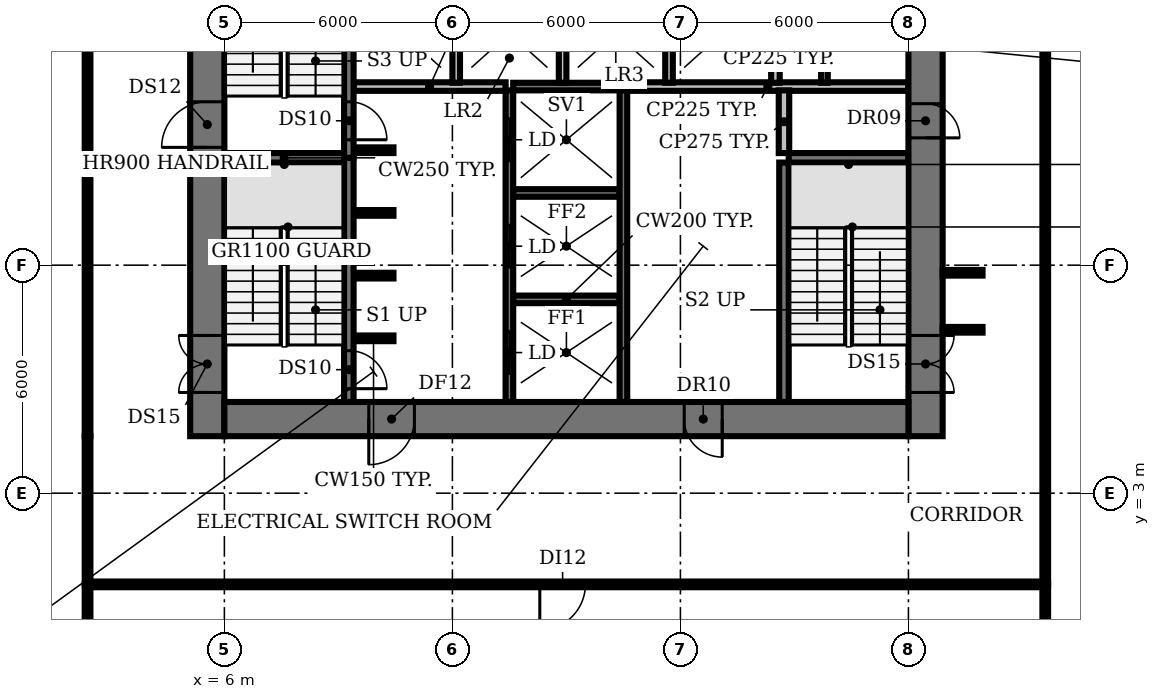
"""IFC4 building model, lengths in metres.
Left out: names, types, materials, properties, quantities, classifications, styles, units other than length and angle.
Written with IfcOpenShell. Run it as: python <this file> out.ifc"""

import sys

from ifc_helpers import new_model, si_unit, direction, frame, frame_2d, origin, place, context, subcontext, project, spatial, rectangle, extrude, element, fill, save


model = new_model("IFC4")
c1 = context("Model", 3, precision=1e-05, world=origin(), true_north=direction((0.0, 1.0)))
c2 = subcontext(c1, "Body", "Model", "MODEL_VIEW")
j1 = project(units=[si_unit("LENGTHUNIT", "METRE"), si_unit("PLANEANGLEUNIT", "RADIAN")], contexts=[c1])
p1 = place(None, origin())
s1 = spatial("IfcSite", under=j1, at=p1, CompositionType="ELEMENT")
p2 = place(p1, origin())
s2 = spatial("IfcBuilding", under=s1, at=p2, CompositionType="ELEMENT")
p3 = place(p2, frame((0.0, 0.0, 29.0)))
s3 = spatial("IfcBuildingStorey", under=s2, at=p3, CompositionType="ELEMENT", Elevation=29.0)
p4 = place(p3, frame((9.4, 7.075, 0.0), z_axis=(0.0, 0.0, 1.0), x_axis=(1.0, 0.0, 0.0)))
e1 = element("IfcWall", 1, at=p4, inside=s3, PredefinedType="SHEAR", context=c2, shape_type="SweptSolid", body=[
    extrude(rectangle(XDim=1.05, YDim=0.15, at=frame_2d((0.525, 0.0))), origin(), (0.0, 0.0, 1.0), 3.85),
])
p5 = place(p3, frame((13.6, 8.1, 0.0), z_axis=(0.0, 0.0, 1.0), x_axis=(1.0, 0.0, 0.0)))
e2 = element("IfcWall", 2, at=p5, inside=s3, PredefinedType="SHEAR", context=c2, shape_type="SweptSolid", body=[
    extrude(rectangle(XDim=2.8, YDim=0.2, at=frame_2d((1.4, 0.0))), origin(), (0.0, 0.0, 1.0), 3.85),
])
for number, where, z_axis, x_axis in (
    (3, (9.4, 8.725, 0.0), (0.0, 0.0, 1.0), (1.0, 0.0, 0.0)),
    (4, (9.4, 10.375, 0.0), (0.0, 0.0, 1.0), (1.0, 0.0, 0.0)),
):
    element("IfcWall", number, at=place(p3, frame(where, z_axis=z_axis, x_axis=x_axis)), inside=s3, PredefinedType="SHEAR", context=c2, shape_type="SweptSolid", body=[
        extrude(rectangle(XDim=1.05, YDim=0.15, at=frame_2d((0.525, 0.0))), origin(), (0.0, 0.0, 1.0), 3.85),
    ])
p6 = place(p3, frame((13.6, 10.9, 0.0), z_axis=(0.0, 0.0, 1.0), x_axis=(1.0, 0.0, 0.0)))
e5 = element("IfcWall", 5, at=p6, inside=s3, PredefinedType="SHEAR", context=c2, shape_type="SweptSolid", body=[
    extrude(rectangle(XDim=2.8, YDim=0.2, at=frame_2d((1.4, 0.0))), origin(), (0.0, 0.0, 1.0), 3.85),
])
for number, where, z_axis, x_axis in (
    (6, (6.0, 11.825, 0.0), (0.0, 0.0, 1.0), (1.0, 0.0, 0.0)),
    (7, (20.85, 11.825, 0.0), (0.0, 0.0, 1.0), (1.0, 0.0, 0.0)),
):
    element("IfcWall", number, at=place(p3, frame(where, z_axis=z_axis, x_axis=x_axis)), inside=s3, PredefinedType="SHEAR", context=c2, shape_type="SweptSolid", body=[
        extrude(rectangle(XDim=3.15, YDim=0.25, at=frame_2d((1.575, 0.0))), origin(), (0.0, 0.0, 1.0), 3.85),
    ])
p7 = place(p3, frame((9.4, 12.025, 0.0), z_axis=(0.0, 0.0, 1.0), x_axis=(1.0, 0.0, 0.0)))
e8 = element("IfcWall", 8, at=p7, inside=s3, PredefinedType="SHEAR", context=c2, shape_type="SweptSolid", body=[
    extrude(rectangle(XDim=1.05, YDim=0.15, at=frame_2d((0.525, 0.0))), origin(), (0.0, 0.0, 1.0), 3.85),
])
p8 = place(p3, frame((9.4, 13.7, 0.0), z_axis=(0.0, 0.0, 1.0), x_axis=(1.0, 0.0, 0.0)))
e9 = element("IfcWall", 9, at=p8, inside=s3, PredefinedType="PARTITIONING", context=c2, shape_type="SweptSolid", body=[
    extrude(rectangle(XDim=4.0, YDim=0.225, at=frame_2d((2.0, 0.0))), origin(), (0.0, 0.0, 1.0), 3.85),
])
p9 = place(p3, frame((13.6, 13.7, 0.0), z_axis=(0.0, 0.0, 1.0), x_axis=(1.0, 0.0, 0.0)))
e10 = element("IfcWall", 10, at=p9, inside=s3, PredefinedType="SHEAR", context=c2, shape_type="SweptSolid", body=[
    extrude(rectangle(XDim=2.8, YDim=0.2, at=frame_2d((1.4, 0.0))), origin(), (0.0, 0.0, 1.0), 3.85),
])
p10 = place(p3, frame((16.6, 13.7, 0.0), z_axis=(0.0, 0.0, 1.0), x_axis=(1.0, 0.0, 0.0)))
e11 = element("IfcWall", 11, at=p10, inside=s3, PredefinedType="PARTITIONING", context=c2, shape_type="SweptSolid", body=[
    extrude(rectangle(XDim=7.4, YDim=0.225, at=frame_2d((3.7, 0.0))), origin(), (0.0, 0.0, 1.0), 3.85),
])
p11 = place(p3, frame((9.275, 11.825, 0.0), z_axis=(0.0, 0.0, 1.0), x_axis=(0.0, -1.0, 0.0)))
e12 = element("IfcWall", 12, at=p11, inside=s3, PredefinedType="SHEAR", context=c2, shape_type="SweptSolid", body=[
    extrude(rectangle(XDim=6.425, YDim=0.25, at=frame_2d((3.212, 0.0))), origin(), (0.0, 0.0, 1.0), 3.85),
])
p12 = place(p11, frame((5.075, 0.0, 0.0)))
e13 = element("IfcOpeningElement", 13, at=p12, cuts=e12, PredefinedType="OPENING", context=c2, shape_type="SweptSolid", body=[
    extrude(rectangle(XDim=1.0, YDim=2.1, at=frame_2d((0.5, 1.05))), frame((0.0, 0.135, 0.0), z_axis=(0.0, -1.0, 0.0), x_axis=(1.0, 0.0, 0.0)), (0.0, 0.0, 1.0), 0.27),
])
p13 = place(p3, frame((9.275, 18.375, 0.0), z_axis=(0.0, 0.0, 1.0), x_axis=(0.0, -1.0, 0.0)))
e14 = element("IfcWall", 14, at=p13, inside=s3, PredefinedType="SHEAR", context=c2, shape_type="SweptSolid", body=[
    extrude(rectangle(XDim=6.55, YDim=0.25, at=frame_2d((3.275, 0.0))), origin(), (0.0, 0.0, 1.0), 3.85),
])
p14 = place(p13, frame((5.075, 0.0, 0.0)))
e15 = element("IfcOpeningElement", 15, at=p14, cuts=e14, PredefinedType="OPENING", context=c2, shape_type="SweptSolid", body=[
    extrude(rectangle(XDim=1.0, YDim=2.1, at=frame_2d((0.5, 1.05))), frame((0.0, 0.135, 0.0), z_axis=(0.0, -1.0, 0.0), x_axis=(1.0, 0.0, 0.0)), (0.0, 0.0, 1.0), 0.27),
])
p15 = place(p3, frame((12.1, 13.8, 0.0), z_axis=(0.0, 0.0, 1.0), x_axis=(0.0, 1.0, 0.0)))
e16 = element("IfcWall", 16, at=p15, inside=s3, PredefinedType="SOLIDWALL", context=c2, shape_type="SweptSolid", body=[
    extrude(rectangle(XDim=2.6, YDim=0.2, at=frame_2d((1.3, 0.0))), origin(), (0.0, 0.0, 1.0), 3.85),
])
p16 = place(p3, frame((13.5, 5.4, 0.0), z_axis=(0.0, 0.0, 1.0), x_axis=(0.0, 1.0, 0.0)))
e17 = element("IfcWall", 17, at=p16, inside=s3, PredefinedType="SHEAR", context=c2, shape_type="SweptSolid", body=[
    extrude(rectangle(XDim=8.2, YDim=0.2, at=frame_2d((4.1, 0.0))), origin(), (0.0, 0.0, 1.0), 3.85),
])
p17 = place(p16, frame((0.75, 0.0, 0.0)))
e18 = element("IfcOpeningElement", 18, at=p17, cuts=e17, PredefinedType="OPENING", context=c2, shape_type="SweptSolid", body=[
    extrude(rectangle(XDim=1.1, YDim=2.1, at=frame_2d((0.55, 1.05))), frame((0.0, 0.11, 0.0), z_axis=(0.0, -1.0, 0.0), x_axis=(1.0, 0.0, 0.0)), (0.0, 0.0, 1.0), 0.22),
])
p18 = place(p16, frame((3.55, 0.0, 0.0)))
e19 = element("IfcOpeningElement", 19, at=p18, cuts=e17, PredefinedType="OPENING", context=c2, shape_type="SweptSolid", body=[
    extrude(rectangle(XDim=1.1, YDim=2.1, at=frame_2d((0.55, 1.05))), frame((0.0, 0.11, 0.0), z_axis=(0.0, -1.0, 0.0), x_axis=(1.0, 0.0, 0.0)), (0.0, 0.0, 1.0), 0.22),
])
p19 = place(p16, frame((6.35, 0.0, 0.0)))
e20 = element("IfcOpeningElement", 20, at=p19, cuts=e17, PredefinedType="OPENING", context=c2, shape_type="SweptSolid", body=[
    extrude(rectangle(XDim=1.1, YDim=2.1, at=frame_2d((0.55, 1.05))), frame((0.0, 0.11, 0.0), z_axis=(0.0, -1.0, 0.0), x_axis=(1.0, 0.0, 0.0)), (0.0, 0.0, 1.0), 0.22),
])
p20 = place(p3, frame((14.9, 13.8, 0.0), z_axis=(0.0, 0.0, 1.0), x_axis=(0.0, 1.0, 0.0)))
e21 = element("IfcWall", 21, at=p20, inside=s3, PredefinedType="SOLIDWALL", context=c2, shape_type="SweptSolid", body=[
    extrude(rectangle(XDim=2.6, YDim=0.2, at=frame_2d((1.3, 0.0))), origin(), (0.0, 0.0, 1.0), 3.85),
])
p21 = place(p3, frame((16.5, 5.4, 0.0), z_axis=(0.0, 0.0, 1.0), x_axis=(0.0, 1.0, 0.0)))
e22 = element("IfcWall", 22, at=p21, inside=s3, PredefinedType="SHEAR", context=c2, shape_type="SweptSolid", body=[
    extrude(rectangle(XDim=8.2, YDim=0.2, at=frame_2d((4.1, 0.0))), origin(), (0.0, 0.0, 1.0), 3.85),
])
p22 = place(p3, frame((17.7, 13.8, 0.0), z_axis=(0.0, 0.0, 1.0), x_axis=(0.0, 1.0, 0.0)))
e23 = element("IfcWall", 23, at=p22, inside=s3, PredefinedType="SOLIDWALL", context=c2, shape_type="SweptSolid", body=[
    extrude(rectangle(XDim=2.6, YDim=0.2, at=frame_2d((1.3, 0.0))), origin(), (0.0, 0.0, 1.0), 3.85),
])
p23 = place(p3, frame((20.5, 13.8, 0.0), z_axis=(0.0, 0.0, 1.0), x_axis=(0.0, 1.0, 0.0)))
e24 = element("IfcWall", 24, at=p23, inside=s3, PredefinedType="PARTITIONING", context=c2, shape_type="SweptSolid", body=[
    extrude(rectangle(XDim=2.6, YDim=0.225, at=frame_2d((1.3, 0.0))), origin(), (0.0, 0.0, 1.0), 3.85),
])
p24 = place(p3, frame((20.725, 5.4, 0.0), z_axis=(0.0, 0.0, 1.0), x_axis=(0.0, 1.0, 0.0)))
e25 = element("IfcWall", 25, at=p24, inside=s3, PredefinedType="SHEAR", context=c2, shape_type="SweptSolid", body=[
    extrude(rectangle(XDim=6.3, YDim=0.25, at=frame_2d((3.15, 0.0))), origin(), (0.0, 0.0, 1.0), 3.85),
])
p25 = place(p3, frame((20.725, 11.95, 0.0), z_axis=(0.0, 0.0, 1.0), x_axis=(0.0, 1.0, 0.0)))
e26 = element("IfcWall", 26, at=p25, inside=s3, PredefinedType="PARTITIONING", context=c2, shape_type="SweptSolid", body=[
    extrude(rectangle(XDim=1.65, YDim=0.275, at=frame_2d((0.825, 0.0))), origin(), (0.0, 0.0, 1.0), 3.85),
])
p26 = place(p3, frame((21.79, 13.8, 0.0), z_axis=(0.0, 0.0, 1.0), x_axis=(0.0, 1.0, 0.0)))
e27 = element("IfcWall", 27, at=p26, inside=s3, PredefinedType="PARTITIONING", context=c2, shape_type="SweptSolid", body=[
    extrude(rectangle(XDim=2.6, YDim=0.175, at=frame_2d((1.3, 0.0))), origin(), (0.0, 0.0, 1.0), 3.85),
])
p27 = place(p3, frame((5.55, 4.5, 0.0), z_axis=(0.0, 0.0, 1.0), x_axis=(0.0, 1.0, 0.0)))
e28 = element("IfcWall", 28, at=p27, inside=s3, PredefinedType="SHEAR", context=c2, shape_type="SweptSolid", body=[
    extrude(rectangle(XDim=21.2, YDim=0.9, at=frame_2d((10.6, 0.0))), origin(), (0.0, 0.0, 1.0), 3.85),
])
p28 = place(p27, frame((1.15, 0.0, 0.0)))
e29 = element("IfcOpeningElement", 29, at=p28, cuts=e28, PredefinedType="OPENING", context=c2, shape_type="SweptSolid", body=[
    extrude(rectangle(XDim=1.5, YDim=2.1, at=frame_2d((0.75, 1.05))), frame((0.0, 0.46, 0.0), z_axis=(0.0, -1.0, 0.0), x_axis=(1.0, 0.0, 0.0)), (0.0, 0.0, 1.0), 0.92),
])
p29 = place(p27, frame((7.6, 0.0, 0.0)))
e30 = element("IfcOpeningElement", 30, at=p29, cuts=e28, PredefinedType="OPENING", context=c2, shape_type="SweptSolid", body=[
    extrude(rectangle(XDim=1.2, YDim=2.1, at=frame_2d((0.6, 1.05))), frame((0.0, 0.46, 0.0), z_axis=(0.0, -1.0, 0.0), x_axis=(1.0, 0.0, 0.0)), (0.0, 0.0, 1.0), 0.92),
])
p30 = place(p27, frame((14.15, 0.0, 0.0)))
e31 = element("IfcOpeningElement", 31, at=p30, cuts=e28, PredefinedType="OPENING", context=c2, shape_type="SweptSolid", body=[
    extrude(rectangle(XDim=1.2, YDim=2.1, at=frame_2d((0.6, 1.05))), frame((0.0, 0.46, 0.0), z_axis=(0.0, -1.0, 0.0), x_axis=(1.0, 0.0, 0.0)), (0.0, 0.0, 1.0), 0.92),
])
p31 = place(p3, frame((24.45, 25.7, 0.0), z_axis=(0.0, 0.0, 1.0), x_axis=(0.0, -1.0, 0.0)))
e32 = element("IfcWall", 32, at=p31, inside=s3, PredefinedType="SHEAR", context=c2, shape_type="SweptSolid", body=[
    extrude(rectangle(XDim=21.2, YDim=0.9, at=frame_2d((10.6, 0.0))), origin(), (0.0, 0.0, 1.0), 3.85),
])
p32 = place(p31, frame((18.55, 0.0, 0.0)))
e33 = element("IfcOpeningElement", 33, at=p32, cuts=e32, PredefinedType="OPENING", context=c2, shape_type="SweptSolid", body=[
    extrude(rectangle(XDim=1.5, YDim=2.1, at=frame_2d((0.75, 1.05))), frame((0.0, 0.46, 0.0), z_axis=(0.0, -1.0, 0.0), x_axis=(1.0, 0.0, 0.0)), (0.0, 0.0, 1.0), 0.92),
])
p33 = place(p31, frame((12.45, 0.0, 0.0)))
e34 = element("IfcOpeningElement", 34, at=p33, cuts=e32, PredefinedType="OPENING", context=c2, shape_type="SweptSolid", body=[
    extrude(rectangle(XDim=0.9, YDim=2.1, at=frame_2d((0.45, 1.05))), frame((0.0, 0.46, 0.0), z_axis=(0.0, -1.0, 0.0), x_axis=(1.0, 0.0, 0.0)), (0.0, 0.0, 1.0), 0.92),
])
p34 = place(p31, frame((6.45, 0.0, 0.0)))
e35 = element("IfcOpeningElement", 35, at=p34, cuts=e32, PredefinedType="OPENING", context=c2, shape_type="SweptSolid", body=[
    extrude(rectangle(XDim=2.0, YDim=2.1, at=frame_2d((1.0, 1.05))), frame((0.0, 0.46, 0.0), z_axis=(0.0, -1.0, 0.0), x_axis=(1.0, 0.0, 0.0)), (0.0, 0.0, 1.0), 0.92),
])
p35 = place(p3, frame((24.0, 4.95, 0.0), z_axis=(0.0, 0.0, 1.0), x_axis=(-1.0, 0.0, 0.0)))
e36 = element("IfcWall", 36, at=p35, inside=s3, PredefinedType="SHEAR", context=c2, shape_type="SweptSolid", body=[
    extrude(rectangle(XDim=18.0, YDim=0.9, at=frame_2d((9.0, 0.0))), origin(), (0.0, 0.0, 1.0), 3.85),
])
p36 = place(p35, frame((13.0, 0.0, 0.0)))
e37 = element("IfcOpeningElement", 37, at=p36, cuts=e36, PredefinedType="OPENING", context=c2, shape_type="SweptSolid", body=[
    extrude(rectangle(XDim=1.2, YDim=2.1, at=frame_2d((0.6, 1.05))), frame((0.0, 0.46, 0.0), z_axis=(0.0, -1.0, 0.0), x_axis=(1.0, 0.0, 0.0)), (0.0, 0.0, 1.0), 0.92),
])
p37 = place(p35, frame((4.9, 0.0, 0.0)))
e38 = element("IfcOpeningElement", 38, at=p37, cuts=e36, PredefinedType="OPENING", context=c2, shape_type="SweptSolid", body=[
    extrude(rectangle(XDim=1.0, YDim=2.1, at=frame_2d((0.5, 1.05))), frame((0.0, 0.46, 0.0), z_axis=(0.0, -1.0, 0.0), x_axis=(1.0, 0.0, 0.0)), (0.0, 0.0, 1.0), 0.92),
])
p38 = place(p3, frame((2.4, -2.22, 0.0), z_axis=(0.0, 0.0, 1.0), x_axis=(0.0, 1.0, 0.0)))
e39 = element("IfcWall", 39, at=p38, inside=s3, PredefinedType="PARTITIONING", context=c2, shape_type="SweptSolid", body=[
    extrude(rectangle(XDim=2.82, YDim=0.15, at=frame_2d((1.41, 0.0))), origin(), (0.0, 0.0, 1.0), 2.83),
])
p39 = place(p3, frame((2.4, 0.6, 0.0), z_axis=(0.0, 0.0, 1.0), x_axis=(0.0, 1.0, 0.0)))
e40 = element("IfcWall", 40, at=p39, inside=s3, PredefinedType="PARTITIONING", context=c2, shape_type="SweptSolid", body=[
    extrude(rectangle(XDim=3.9, YDim=0.15, at=frame_2d((1.95, 0.0))), origin(), (0.0, 0.0, 1.0), 2.83),
])
p40 = place(p3, frame((2.4, 4.5, 0.0), z_axis=(0.0, 0.0, 1.0), x_axis=(0.0, 1.0, 0.0)))
e41 = element("IfcWall", 41, at=p40, inside=s3, PredefinedType="PARTITIONING", context=c2, shape_type="SweptSolid", body=[
    extrude(rectangle(XDim=21.2, YDim=0.15, at=frame_2d((10.6, 0.0))), origin(), (0.0, 0.0, 1.0), 2.83),
])
p41 = place(p40, frame((10.8, 0.0, 0.0)))
e42 = element("IfcOpeningElement", 42, at=p41, cuts=e41, PredefinedType="OPENING", context=c2, shape_type="SweptSolid", body=[
    extrude(rectangle(XDim=1.2, YDim=2.1, at=frame_2d((0.6, 1.05))), frame((0.0, 0.085, 0.0), z_axis=(0.0, -1.0, 0.0), x_axis=(1.0, 0.0, 0.0)), (0.0, 0.0, 1.0), 0.17),
])
for number, where, z_axis, x_axis in (
    (43, (24.9, 7.3, 0.0), (0.0, 0.0, 1.0), (1.0, 0.0, 0.0)),
    (44, (24.9, 8.8, 0.0), (0.0, 0.0, 1.0), (1.0, 0.0, 0.0)),
):
    element("IfcWall", number, at=place(p3, frame(where, z_axis=z_axis, x_axis=x_axis)), inside=s3, PredefinedType="PARTITIONING", context=c2, shape_type="SweptSolid", body=[
        extrude(rectangle(XDim=1.05, YDim=0.15, at=frame_2d((0.525, 0.0))), origin(), (0.0, 0.0, 1.0), 2.83),
    ])
p42 = place(p3, frame((27.6, -5.18, 0.0), z_axis=(0.0, 0.0, 1.0), x_axis=(0.0, 1.0, 0.0)))
e45 = element("IfcWall", 45, at=p42, inside=s3, PredefinedType="PARTITIONING", context=c2, shape_type="SweptSolid", body=[
    extrude(rectangle(XDim=5.78, YDim=0.15, at=frame_2d((2.89, 0.0))), origin(), (0.0, 0.0, 1.0), 2.83),
])
p43 = place(p3, frame((27.6, 0.6, 0.0), z_axis=(0.0, 0.0, 1.0), x_axis=(-1.0, 0.0, 0.0)))
e46 = element("IfcWall", 46, at=p43, inside=s3, PredefinedType="PARTITIONING", context=c2, shape_type="SweptSolid", body=[
    extrude(rectangle(XDim=25.2, YDim=0.15, at=frame_2d((12.6, 0.0))), origin(), (0.0, 0.0, 1.0), 2.83),
])
p44 = place(p43, frame((12.1, 0.0, 0.0)))
e47 = element("IfcOpeningElement", 47, at=p44, cuts=e46, PredefinedType="OPENING", context=c2, shape_type="SweptSolid", body=[
    extrude(rectangle(XDim=1.2, YDim=2.1, at=frame_2d((0.6, 1.05))), frame((0.0, 0.085, 0.0), z_axis=(0.0, -1.0, 0.0), x_axis=(1.0, 0.0, 0.0)), (0.0, 0.0, 1.0), 0.17),
])
p45 = place(p3, frame((27.6, 0.6, 0.0), z_axis=(0.0, 0.0, 1.0), x_axis=(0.0, 1.0, 0.0)))
e48 = element("IfcWall", 48, at=p45, inside=s3, PredefinedType="PARTITIONING", context=c2, shape_type="SweptSolid", body=[
    extrude(rectangle(XDim=14.4, YDim=0.15, at=frame_2d((7.2, 0.0))), origin(), (0.0, 0.0, 1.0), 2.83),
])
p46 = place(p12, origin())
e49 = element("IfcDoor", 49, at=p46, inside=s3, OperationType="SINGLE_SWING_RIGHT", PredefinedType="DOOR", context=c2, shape_type="SweptSolid", body=[
    extrude(rectangle(XDim=1.0, YDim=2.1, at=frame_2d((0.5, 1.05))), frame((0.0, 0.025, 0.0), z_axis=(0.0, -1.0, 0.0), x_axis=(1.0, 0.0, 0.0)), (0.0, 0.0, 1.0), 0.05),
])
fill(e13, e49)
p47 = place(p14, origin())
e50 = element("IfcDoor", 50, at=p47, inside=s3, OperationType="SINGLE_SWING_RIGHT", PredefinedType="DOOR", context=c2, shape_type="SweptSolid", body=[
    extrude(rectangle(XDim=1.0, YDim=2.1, at=frame_2d((0.5, 1.05))), frame((0.0, 0.025, 0.0), z_axis=(0.0, -1.0, 0.0), x_axis=(1.0, 0.0, 0.0)), (0.0, 0.0, 1.0), 0.05),
])
fill(e15, e50)
p48 = place(p17, origin())
e51 = element("IfcDoor", 51, at=p48, inside=s3, OperationType="DOUBLE_DOOR_SLIDING", PredefinedType="DOOR", context=c2, shape_type="SweptSolid", body=[
    extrude(rectangle(XDim=1.1, YDim=2.1, at=frame_2d((0.55, 1.05))), frame((0.0, 0.025, 0.0), z_axis=(0.0, -1.0, 0.0), x_axis=(1.0, 0.0, 0.0)), (0.0, 0.0, 1.0), 0.05),
])
fill(e18, e51)
p49 = place(p18, origin())
e52 = element("IfcDoor", 52, at=p49, inside=s3, OperationType="DOUBLE_DOOR_SLIDING", PredefinedType="DOOR", context=c2, shape_type="SweptSolid", body=[
    extrude(rectangle(XDim=1.1, YDim=2.1, at=frame_2d((0.55, 1.05))), frame((0.0, 0.025, 0.0), z_axis=(0.0, -1.0, 0.0), x_axis=(1.0, 0.0, 0.0)), (0.0, 0.0, 1.0), 0.05),
])
fill(e19, e52)
p50 = place(p19, origin())
e53 = element("IfcDoor", 53, at=p50, inside=s3, OperationType="DOUBLE_DOOR_SLIDING", PredefinedType="DOOR", context=c2, shape_type="SweptSolid", body=[
    extrude(rectangle(XDim=1.1, YDim=2.1, at=frame_2d((0.55, 1.05))), frame((0.0, 0.025, 0.0), z_axis=(0.0, -1.0, 0.0), x_axis=(1.0, 0.0, 0.0)), (0.0, 0.0, 1.0), 0.05),
])
fill(e20, e53)
p51 = place(p28, origin())
e54 = element("IfcDoor", 54, at=p51, inside=s3, OperationType="DOUBLE_DOOR_SINGLE_SWING", PredefinedType="DOOR", context=c2, shape_type="SweptSolid", body=[
    extrude(rectangle(XDim=1.5, YDim=2.1, at=frame_2d((0.75, 1.05))), frame((0.0, 0.025, 0.0), z_axis=(0.0, -1.0, 0.0), x_axis=(1.0, 0.0, 0.0)), (0.0, 0.0, 1.0), 0.05),
])
fill(e29, e54)
p52 = place(p29, origin())
e55 = element("IfcDoor", 55, at=p52, inside=s3, OperationType="SINGLE_SWING_LEFT", PredefinedType="DOOR", context=c2, shape_type="SweptSolid", body=[
    extrude(rectangle(XDim=1.2, YDim=2.1, at=frame_2d((0.6, 1.05))), frame((0.0, 0.025, 0.0), z_axis=(0.0, -1.0, 0.0), x_axis=(1.0, 0.0, 0.0)), (0.0, 0.0, 1.0), 0.05),
])
fill(e30, e55)
p53 = place(p32, origin())
e56 = element("IfcDoor", 56, at=p53, inside=s3, OperationType="DOUBLE_DOOR_SINGLE_SWING", PredefinedType="DOOR", context=c2, shape_type="SweptSolid", body=[
    extrude(rectangle(XDim=1.5, YDim=2.1, at=frame_2d((0.75, 1.05))), frame((0.0, 0.025, 0.0), z_axis=(0.0, -1.0, 0.0), x_axis=(1.0, 0.0, 0.0)), (0.0, 0.0, 1.0), 0.05),
])
fill(e33, e56)
p54 = place(p33, origin())
e57 = element("IfcDoor", 57, at=p54, inside=s3, OperationType="SINGLE_SWING_RIGHT", PredefinedType="DOOR", context=c2, shape_type="SweptSolid", body=[
    extrude(rectangle(XDim=0.9, YDim=2.1, at=frame_2d((0.45, 1.05))), frame((0.0, -0.39, 0.0), z_axis=(0.0, -1.0, 0.0), x_axis=(1.0, 0.0, 0.0)), (0.0, 0.0, 1.0), 0.05),
])
fill(e34, e57)
p55 = place(p36, origin())
e58 = element("IfcDoor", 58, at=p55, inside=s3, OperationType="SINGLE_SWING_RIGHT", PredefinedType="DOOR", context=c2, shape_type="SweptSolid", body=[
    extrude(rectangle(XDim=1.2, YDim=2.1, at=frame_2d((0.6, 1.05))), frame((0.0, 0.025, 0.0), z_axis=(0.0, -1.0, 0.0), x_axis=(1.0, 0.0, 0.0)), (0.0, 0.0, 1.0), 0.05),
])
fill(e37, e58)
p56 = place(p37, origin())
e59 = element("IfcDoor", 59, at=p56, inside=s3, OperationType="SINGLE_SWING_LEFT", PredefinedType="DOOR", context=c2, shape_type="SweptSolid", body=[
    extrude(rectangle(XDim=1.0, YDim=2.1, at=frame_2d((0.5, 1.05))), frame((0.0, -0.39, 0.0), z_axis=(0.0, -1.0, 0.0), x_axis=(1.0, 0.0, 0.0)), (0.0, 0.0, 1.0), 0.05),
])
fill(e38, e59)
p57 = place(p44, origin())
e60 = element("IfcDoor", 60, at=p57, inside=s3, OperationType="SINGLE_SWING_RIGHT", PredefinedType="DOOR", context=c2, shape_type="SweptSolid", body=[
    extrude(rectangle(XDim=1.2, YDim=2.1, at=frame_2d((0.6, 1.05))), frame((0.0, 0.025, 0.0), z_axis=(0.0, -1.0, 0.0), x_axis=(1.0, 0.0, 0.0)), (0.0, 0.0, 1.0), 0.05),
])
fill(e47, e60)
save(model, sys.argv[1])
